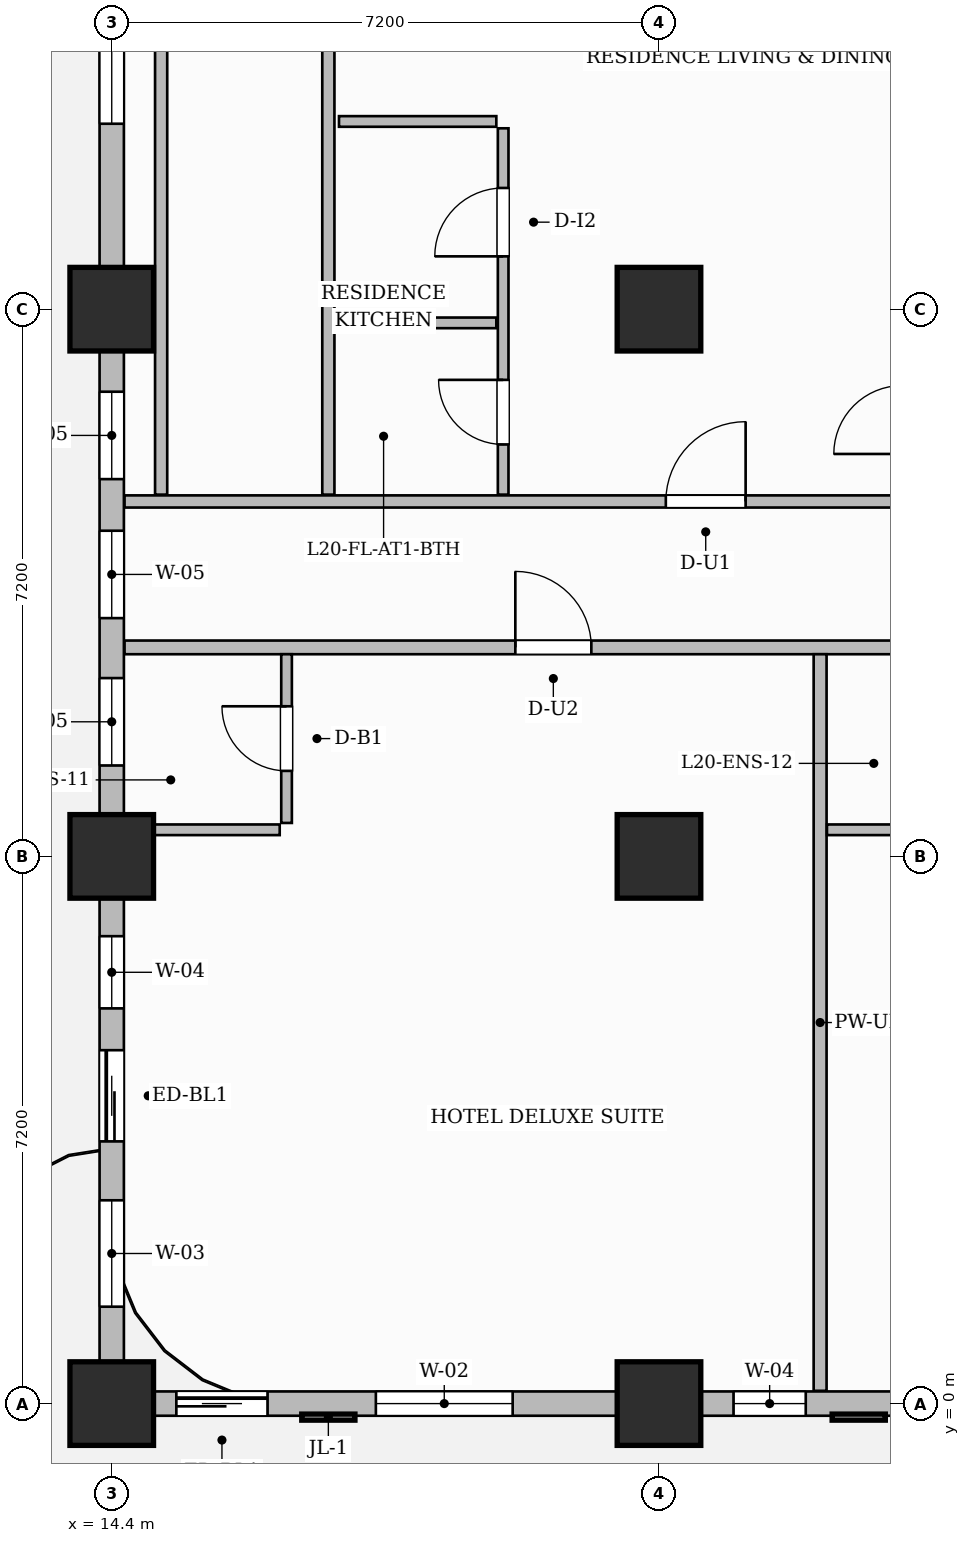
"""IFC4 building model, lengths in metres.
Left out: names, types, materials, properties, quantities, classifications, styles, units other than length and angle.
Written with IfcOpenShell. Run it as: python <this file> out.ifc"""

import sys

from ifc_helpers import new_model, si_unit, direction, frame, frame_2d, origin, origin_2d, place, context, subcontext, project, spatial, rectangle, extrude, source, transform, mapped, element, fill, save


model = new_model("IFC4")
c1 = context("Model", 3, precision=1e-05, world=origin(), true_north=direction((0.0, 1.0)))
c2 = subcontext(c1, "Body", "Model", "MODEL_VIEW")
j1 = project(units=[si_unit("LENGTHUNIT", "METRE"), si_unit("PLANEANGLEUNIT", "RADIAN")], contexts=[c1])
p1 = place(None, origin())
s1 = spatial("IfcSite", under=j1, at=p1, CompositionType="ELEMENT")
p2 = place(p1, origin())
s2 = spatial("IfcBuilding", under=s1, at=p2, CompositionType="ELEMENT")
p3 = place(p2, frame((0.0, 0.0, 84.2)))
s3 = spatial("IfcBuildingStorey", under=s2, at=p3, CompositionType="ELEMENT", Elevation=84.2)
m1 = source(origin(), c2, "Body", "SweptSolid", [
    extrude(rectangle(XDim=1.1, YDim=1.1, at=origin_2d()), origin(), (0.0, 0.0, 1.0), 3.7),
])
for number, where, z_axis, x_axis in (
    (1, (14.4, 0.0, 0.0), (0.0, 0.0, 1.0), (1.0, 0.0, 0.0)),
    (2, (14.4, 7.2, 0.0), (0.0, 0.0, 1.0), (1.0, 0.0, 0.0)),
    (3, (14.4, 14.4, 0.0), (0.0, 0.0, 1.0), (1.0, 0.0, 0.0)),
    (4, (21.6, 0.0, 0.0), (0.0, 0.0, 1.0), (1.0, 0.0, 0.0)),
    (5, (21.6, 7.2, 0.0), (0.0, 0.0, 1.0), (1.0, 0.0, 0.0)),
    (6, (21.6, 14.4, 0.0), (0.0, 0.0, 1.0), (1.0, 0.0, 0.0)),
):
    element("IfcColumn", number, at=place(p3, frame(where, z_axis=z_axis, x_axis=x_axis)), inside=s3, PredefinedType="COLUMN", context=c2, shape_type="MappedRepresentation", body=[
        mapped(m1, transform((0.0, 0.0, 0.0), scale=1.0)),
    ])
p4 = place(p3, frame((14.568, 9.95, 0.0), z_axis=(0.0, 0.0, 1.0), x_axis=(1.0, 0.0, 0.0)))
e7 = element("IfcWall", 7, at=p4, inside=s3, PredefinedType="PARTITIONING", context=c2, shape_type="SweptSolid", body=[
    extrude(rectangle(XDim=15.542, YDim=0.18, at=frame_2d((7.771, 0.0))), origin(), (0.0, 0.0, 1.0), 3.45),
])
p5 = place(p4, frame((5.142, 0.0, 0.0)))
e8 = element("IfcOpeningElement", 8, at=p5, cuts=e7, PredefinedType="OPENING", context=c2, shape_type="SweptSolid", body=[
    extrude(rectangle(XDim=1.0, YDim=2.2, at=frame_2d((0.5, 1.1))), frame((0.0, 0.1, 0.0), z_axis=(0.0, -1.0, 0.0), x_axis=(1.0, 0.0, 0.0)), (0.0, 0.0, 1.0), 0.2),
])
p6 = place(p4, frame((13.017, 0.0, 0.0)))
e9 = element("IfcOpeningElement", 9, at=p6, cuts=e7, PredefinedType="OPENING", context=c2, shape_type="SweptSolid", body=[
    extrude(rectangle(XDim=1.05, YDim=2.25, at=frame_2d((0.525, 1.125))), frame((0.0, 0.1, 0.0), z_axis=(0.0, -1.0, 0.0), x_axis=(1.0, 0.0, 0.0)), (0.0, 0.0, 1.0), 0.2),
])
p7 = place(p3, frame((14.568, 11.87, 0.0), z_axis=(0.0, 0.0, 1.0), x_axis=(1.0, 0.0, 0.0)))
e10 = element("IfcWall", 10, at=p7, inside=s3, PredefinedType="PARTITIONING", context=c2, shape_type="SweptSolid", body=[
    extrude(rectangle(XDim=15.542, YDim=0.16, at=frame_2d((7.771, 0.0))), origin(), (0.0, 0.0, 1.0), 3.45),
])
p8 = place(p7, frame((7.122, 0.0, 0.0)))
e11 = element("IfcOpeningElement", 11, at=p8, cuts=e10, PredefinedType="OPENING", context=c2, shape_type="SweptSolid", body=[
    extrude(rectangle(XDim=1.05, YDim=2.25, at=frame_2d((0.525, 1.125))), frame((0.0, 0.09, 0.0), z_axis=(0.0, -1.0, 0.0), x_axis=(1.0, 0.0, 0.0)), (0.0, 0.0, 1.0), 0.18),
])
p9 = place(p3, frame((23.72, 0.168, 0.0), z_axis=(0.0, 0.0, 1.0), x_axis=(0.0, 1.0, 0.0)))
e12 = element("IfcWall", 12, at=p9, inside=s3, PredefinedType="PARTITIONING", context=c2, shape_type="SweptSolid", body=[
    extrude(rectangle(XDim=9.692, YDim=0.17, at=frame_2d((4.846, 0.0))), origin(), (0.0, 0.0, 1.0), 3.45),
])
p10 = place(p3, frame((16.7, 7.64, 0.0), z_axis=(0.0, 0.0, 1.0), x_axis=(0.0, 1.0, 0.0)))
e13 = element("IfcWall", 13, at=p10, inside=s3, PredefinedType="PARTITIONING", context=c2, shape_type="SweptSolid", body=[
    extrude(rectangle(XDim=2.22, YDim=0.14, at=frame_2d((1.11, 0.0))), origin(), (0.0, 0.0, 1.0), 3.45),
])
p11 = place(p10, frame((0.685, 0.0, 0.0)))
e14 = element("IfcOpeningElement", 14, at=p11, cuts=e13, PredefinedType="OPENING", context=c2, shape_type="SweptSolid", body=[
    extrude(rectangle(XDim=0.85, YDim=2.1, at=frame_2d((0.425, 1.05))), frame((0.0, 0.08, 0.0), z_axis=(0.0, -1.0, 0.0), x_axis=(1.0, 0.0, 0.0)), (0.0, 0.0, 1.0), 0.16),
])
p12 = place(p3, frame((14.49, 7.55, 0.0), z_axis=(0.0, 0.0, 1.0), x_axis=(1.0, 0.0, 0.0)))
e15 = element("IfcWall", 15, at=p12, inside=s3, PredefinedType="PARTITIONING", context=c2, shape_type="SweptSolid", body=[
    extrude(rectangle(XDim=2.12, YDim=0.14, at=frame_2d((1.06, 0.0))), origin(), (0.0, 0.0, 1.0), 3.45),
])
p13 = place(p3, frame((23.81, 7.55, 0.0), z_axis=(0.0, 0.0, 1.0), x_axis=(1.0, 0.0, 0.0)))
e16 = element("IfcWall", 16, at=p13, inside=s3, PredefinedType="PARTITIONING", context=c2, shape_type="SweptSolid", body=[
    extrude(rectangle(XDim=2.12, YDim=0.14, at=frame_2d((1.06, 0.0))), origin(), (0.0, 0.0, 1.0), 3.45),
])
for number, where, z_axis, x_axis in (
    (17, (15.05, 11.96, 0.0), (0.0, 0.0, 1.0), (0.0, 1.0, 0.0)),
    (18, (17.25, 11.96, 0.0), (0.0, 0.0, 1.0), (0.0, 1.0, 0.0)),
):
    element("IfcWall", number, at=place(p3, frame(where, z_axis=z_axis, x_axis=x_axis)), inside=s3, PredefinedType="PARTITIONING", context=c2, shape_type="SweptSolid", body=[
        extrude(rectangle(XDim=13.15, YDim=0.16, at=frame_2d((6.575, 0.0))), origin(), (0.0, 0.0, 1.0), 3.45),
    ])
p14 = place(p3, frame((19.55, 11.96, 0.0), z_axis=(0.0, 0.0, 1.0), x_axis=(0.0, 1.0, 0.0)))
e19 = element("IfcWall", 19, at=p14, inside=s3, PredefinedType="PARTITIONING", context=c2, shape_type="SweptSolid", body=[
    extrude(rectangle(XDim=4.82, YDim=0.14, at=frame_2d((2.41, 0.0))), origin(), (0.0, 0.0, 1.0), 3.45),
])
p15 = place(p14, frame((0.66, 0.0, 0.0)))
e20 = element("IfcOpeningElement", 20, at=p15, cuts=e19, PredefinedType="OPENING", context=c2, shape_type="SweptSolid", body=[
    extrude(rectangle(XDim=0.85, YDim=2.1, at=frame_2d((0.425, 1.05))), frame((0.0, 0.08, 0.0), z_axis=(0.0, -1.0, 0.0), x_axis=(1.0, 0.0, 0.0)), (0.0, 0.0, 1.0), 0.16),
])
p16 = place(p14, frame((3.135, 0.0, 0.0)))
e21 = element("IfcOpeningElement", 21, at=p16, cuts=e19, PredefinedType="OPENING", context=c2, shape_type="SweptSolid", body=[
    extrude(rectangle(XDim=0.9, YDim=2.15, at=frame_2d((0.45, 1.075))), frame((0.0, 0.08, 0.0), z_axis=(0.0, -1.0, 0.0), x_axis=(1.0, 0.0, 0.0)), (0.0, 0.0, 1.0), 0.16),
])
p17 = place(p3, frame((17.39, 14.22, 0.0), z_axis=(0.0, 0.0, 1.0), x_axis=(1.0, 0.0, 0.0)))
e22 = element("IfcWall", 22, at=p17, inside=s3, PredefinedType="PARTITIONING", context=c2, shape_type="SweptSolid", body=[
    extrude(rectangle(XDim=2.07, YDim=0.14, at=frame_2d((1.035, 0.0))), origin(), (0.0, 0.0, 1.0), 2.885),
])
p18 = place(p3, frame((17.39, 16.87, 0.0), z_axis=(0.0, 0.0, 1.0), x_axis=(1.0, 0.0, 0.0)))
e23 = element("IfcWall", 23, at=p18, inside=s3, PredefinedType="PARTITIONING", context=c2, shape_type="SweptSolid", body=[
    extrude(rectangle(XDim=2.07, YDim=0.14, at=frame_2d((1.035, 0.0))), origin(), (0.0, 0.0, 1.0), 3.45),
])
p19 = place(p3, frame((14.4, 0.0, 0.0), z_axis=(0.0, 0.0, 1.0), x_axis=(1.0, 0.0, 0.0)))
e24 = element("IfcWall", 24, at=p19, inside=s3, PredefinedType="SOLIDWALL", context=c2, shape_type="SweptSolid", body=[
    extrude(rectangle(XDim=43.2, YDim=0.32, at=frame_2d((21.6, 0.0))), origin(), (0.0, 0.0, 1.0), 2.885),
])
p20 = place(p19, frame((0.85, 0.0, 0.0)))
e25 = element("IfcOpeningElement", 25, at=p20, cuts=e24, PredefinedType="OPENING", context=c2, shape_type="SweptSolid", body=[
    extrude(rectangle(XDim=1.2, YDim=2.2, at=frame_2d((0.6, 1.1))), frame((0.0, 0.17, 0.0), z_axis=(0.0, -1.0, 0.0), x_axis=(1.0, 0.0, 0.0)), (0.0, 0.0, 1.0), 0.34),
])
p21 = place(p19, frame((3.475, 0.0, 0.8)))
e26 = element("IfcOpeningElement", 26, at=p21, cuts=e24, PredefinedType="OPENING", context=c2, shape_type="SweptSolid", body=[
    extrude(rectangle(XDim=1.8, YDim=1.85, at=frame_2d((0.9, 0.925))), frame((0.0, 0.17, 0.0), z_axis=(0.0, -1.0, 0.0), x_axis=(1.0, 0.0, 0.0)), (0.0, 0.0, 1.0), 0.34),
])
p22 = place(p19, frame((8.181, 0.0, 0.8)))
e27 = element("IfcOpeningElement", 27, at=p22, cuts=e24, PredefinedType="OPENING", context=c2, shape_type="SweptSolid", body=[
    extrude(rectangle(XDim=0.95, YDim=1.75, at=frame_2d((0.475, 0.875))), frame((0.0, 0.17, 0.0), z_axis=(0.0, -1.0, 0.0), x_axis=(1.0, 0.0, 0.0)), (0.0, 0.0, 1.0), 0.34),
])
p23 = place(p19, frame((10.564, 0.0, 0.8)))
e28 = element("IfcOpeningElement", 28, at=p23, cuts=e24, PredefinedType="OPENING", context=c2, shape_type="SweptSolid", body=[
    extrude(rectangle(XDim=1.8, YDim=1.85, at=frame_2d((0.9, 0.925))), frame((0.0, 0.17, 0.0), z_axis=(0.0, -1.0, 0.0), x_axis=(1.0, 0.0, 0.0)), (0.0, 0.0, 1.0), 0.34),
])
p24 = place(p19, frame((16.804, 0.0, 0.8)))
e29 = element("IfcOpeningElement", 29, at=p24, cuts=e24, PredefinedType="OPENING", context=c2, shape_type="SweptSolid", body=[
    extrude(rectangle(XDim=1.8, YDim=1.85, at=frame_2d((0.9, 0.925))), frame((0.0, 0.17, 0.0), z_axis=(0.0, -1.0, 0.0), x_axis=(1.0, 0.0, 0.0)), (0.0, 0.0, 1.0), 0.34),
])
p25 = place(p19, frame((21.725, 0.0, 0.8)))
e30 = element("IfcOpeningElement", 30, at=p25, cuts=e24, PredefinedType="OPENING", context=c2, shape_type="SweptSolid", body=[
    extrude(rectangle(XDim=1.8, YDim=1.85, at=frame_2d((0.9, 0.925))), frame((0.0, 0.17, 0.0), z_axis=(0.0, -1.0, 0.0), x_axis=(1.0, 0.0, 0.0)), (0.0, 0.0, 1.0), 0.34),
])
p26 = place(p19, frame((24.475, 0.0, 0.8)))
e31 = element("IfcOpeningElement", 31, at=p26, cuts=e24, PredefinedType="OPENING", context=c2, shape_type="SweptSolid", body=[
    extrude(rectangle(XDim=1.8, YDim=1.85, at=frame_2d((0.9, 0.925))), frame((0.0, 0.17, 0.0), z_axis=(0.0, -1.0, 0.0), x_axis=(1.0, 0.0, 0.0)), (0.0, 0.0, 1.0), 0.34),
])
p27 = place(p19, frame((29.075, 0.0, 0.8)))
e32 = element("IfcOpeningElement", 32, at=p27, cuts=e24, PredefinedType="OPENING", context=c2, shape_type="SweptSolid", body=[
    extrude(rectangle(XDim=1.8, YDim=1.85, at=frame_2d((0.9, 0.925))), frame((0.0, 0.17, 0.0), z_axis=(0.0, -1.0, 0.0), x_axis=(1.0, 0.0, 0.0)), (0.0, 0.0, 1.0), 0.34),
])
p28 = place(p19, frame((32.125, 0.0, 0.8)))
e33 = element("IfcOpeningElement", 33, at=p28, cuts=e24, PredefinedType="OPENING", context=c2, shape_type="SweptSolid", body=[
    extrude(rectangle(XDim=1.8, YDim=1.85, at=frame_2d((0.9, 0.925))), frame((0.0, 0.17, 0.0), z_axis=(0.0, -1.0, 0.0), x_axis=(1.0, 0.0, 0.0)), (0.0, 0.0, 1.0), 0.34),
])
p29 = place(p19, frame((36.875, 0.0, 0.8)))
e34 = element("IfcOpeningElement", 34, at=p29, cuts=e24, PredefinedType="OPENING", context=c2, shape_type="SweptSolid", body=[
    extrude(rectangle(XDim=1.8, YDim=1.85, at=frame_2d((0.9, 0.925))), frame((0.0, 0.17, 0.0), z_axis=(0.0, -1.0, 0.0), x_axis=(1.0, 0.0, 0.0)), (0.0, 0.0, 1.0), 0.34),
])
p30 = place(p19, frame((39.925, 0.0, 0.8)))
e35 = element("IfcOpeningElement", 35, at=p30, cuts=e24, PredefinedType="OPENING", context=c2, shape_type="SweptSolid", body=[
    extrude(rectangle(XDim=1.8, YDim=1.85, at=frame_2d((0.9, 0.925))), frame((0.0, 0.17, 0.0), z_axis=(0.0, -1.0, 0.0), x_axis=(1.0, 0.0, 0.0)), (0.0, 0.0, 1.0), 0.34),
])
p31 = place(p3, frame((14.4, 0.05, 0.0), z_axis=(0.0, 0.0, 1.0), x_axis=(0.0, 1.0, 0.0)))
e36 = element("IfcWall", 36, at=p31, inside=s3, PredefinedType="SOLIDWALL", context=c2, shape_type="SweptSolid", body=[
    extrude(rectangle(XDim=20.6, YDim=0.32, at=frame_2d((10.3, 0.0))), origin(), (0.0, 0.0, 1.0), 2.885),
])
p32 = place(p31, frame((3.4, 0.0, 0.0)))
e37 = element("IfcOpeningElement", 37, at=p32, cuts=e36, PredefinedType="OPENING", context=c2, shape_type="SweptSolid", body=[
    extrude(rectangle(XDim=1.2, YDim=2.2, at=frame_2d((0.6, 1.1))), frame((0.0, 0.17, 0.0), z_axis=(0.0, -1.0, 0.0), x_axis=(1.0, 0.0, 0.0)), (0.0, 0.0, 1.0), 0.34),
])
p33 = place(p31, frame((1.225, 0.0, 0.8)))
e38 = element("IfcOpeningElement", 38, at=p33, cuts=e36, PredefinedType="OPENING", context=c2, shape_type="SweptSolid", body=[
    extrude(rectangle(XDim=1.4, YDim=1.85, at=frame_2d((0.7, 0.925))), frame((0.0, 0.17, 0.0), z_axis=(0.0, -1.0, 0.0), x_axis=(1.0, 0.0, 0.0)), (0.0, 0.0, 1.0), 0.34),
])
p34 = place(p31, frame((5.15, 0.0, 0.8)))
e39 = element("IfcOpeningElement", 39, at=p34, cuts=e36, PredefinedType="OPENING", context=c2, shape_type="SweptSolid", body=[
    extrude(rectangle(XDim=0.95, YDim=1.75, at=frame_2d((0.475, 0.875))), frame((0.0, 0.17, 0.0), z_axis=(0.0, -1.0, 0.0), x_axis=(1.0, 0.0, 0.0)), (0.0, 0.0, 1.0), 0.34),
])
p35 = place(p31, frame((8.346, 0.0, 0.8)))
e40 = element("IfcOpeningElement", 40, at=p35, cuts=e36, PredefinedType="OPENING", context=c2, shape_type="SweptSolid", body=[
    extrude(rectangle(XDim=1.15, YDim=1.8, at=frame_2d((0.575, 0.9))), frame((0.0, 0.17, 0.0), z_axis=(0.0, -1.0, 0.0), x_axis=(1.0, 0.0, 0.0)), (0.0, 0.0, 1.0), 0.34),
])
p36 = place(p31, frame((10.285, 0.0, 0.8)))
e41 = element("IfcOpeningElement", 41, at=p36, cuts=e36, PredefinedType="OPENING", context=c2, shape_type="SweptSolid", body=[
    extrude(rectangle(XDim=1.15, YDim=1.8, at=frame_2d((0.575, 0.9))), frame((0.0, 0.17, 0.0), z_axis=(0.0, -1.0, 0.0), x_axis=(1.0, 0.0, 0.0)), (0.0, 0.0, 1.0), 0.34),
])
p37 = place(p31, frame((12.114, 0.0, 0.8)))
e42 = element("IfcOpeningElement", 42, at=p37, cuts=e36, PredefinedType="OPENING", context=c2, shape_type="SweptSolid", body=[
    extrude(rectangle(XDim=1.15, YDim=1.8, at=frame_2d((0.575, 0.9))), frame((0.0, 0.17, 0.0), z_axis=(0.0, -1.0, 0.0), x_axis=(1.0, 0.0, 0.0)), (0.0, 0.0, 1.0), 0.34),
])
p38 = place(p31, frame((16.79, 0.0, 0.8)))
e43 = element("IfcOpeningElement", 43, at=p38, cuts=e36, PredefinedType="OPENING", context=c2, shape_type="SweptSolid", body=[
    extrude(rectangle(XDim=1.8, YDim=1.85, at=frame_2d((0.9, 0.925))), frame((0.0, 0.17, 0.0), z_axis=(0.0, -1.0, 0.0), x_axis=(1.0, 0.0, 0.0)), (0.0, 0.0, 1.0), 0.34),
])
m2 = source(origin(), c2, "Body", "SweptSolid", [
    extrude(rectangle(XDim=0.85, YDim=2.1, at=frame_2d((0.425, 1.05))), frame((0.0, 0.025, 0.0), z_axis=(0.0, -1.0, 0.0), x_axis=(1.0, 0.0, 0.0)), (0.0, 0.0, 1.0), 0.05),
])
p39 = place(p11, origin())
e44 = element("IfcDoor", 44, at=p39, inside=s3, OperationType="SINGLE_SWING_RIGHT", PredefinedType="DOOR", context=c2, shape_type="MappedRepresentation", body=[
    mapped(m2, transform((0.0, 0.0, 0.0), scale=1.0)),
])
fill(e14, e44)
m3 = source(origin(), c2, "Body", "SweptSolid", [
    extrude(rectangle(XDim=1.0, YDim=2.2, at=frame_2d((0.5, 1.1))), frame((0.0, 0.025, 0.0), z_axis=(0.0, -1.0, 0.0), x_axis=(1.0, 0.0, 0.0)), (0.0, 0.0, 1.0), 0.05),
])
p40 = place(p5, origin())
e45 = element("IfcDoor", 45, at=p40, inside=s3, OperationType="SINGLE_SWING_LEFT", PredefinedType="DOOR", context=c2, shape_type="MappedRepresentation", body=[
    mapped(m3, transform((0.0, 0.0, 0.0), scale=1.0)),
])
fill(e8, e45)
p41 = place(p15, origin())
e46 = element("IfcDoor", 46, at=p41, inside=s3, OperationType="SINGLE_SWING_RIGHT", PredefinedType="DOOR", context=c2, shape_type="MappedRepresentation", body=[
    mapped(m2, transform((0.0, 0.0, 0.0), scale=1.0)),
])
fill(e20, e46)
m4 = source(origin(), c2, "Body", "SweptSolid", [
    extrude(rectangle(XDim=0.9, YDim=2.15, at=frame_2d((0.45, 1.075))), frame((0.0, 0.025, 0.0), z_axis=(0.0, -1.0, 0.0), x_axis=(1.0, 0.0, 0.0)), (0.0, 0.0, 1.0), 0.05),
])
p42 = place(p16, origin())
e47 = element("IfcDoor", 47, at=p42, inside=s3, OperationType="SINGLE_SWING_LEFT", PredefinedType="DOOR", context=c2, shape_type="MappedRepresentation", body=[
    mapped(m4, transform((0.0, 0.0, 0.0), scale=1.0)),
])
fill(e21, e47)
m5 = source(origin(), c2, "Body", "SweptSolid", [
    extrude(rectangle(XDim=1.05, YDim=2.25, at=frame_2d((0.525, 1.125))), frame((0.0, 0.025, 0.0), z_axis=(0.0, -1.0, 0.0), x_axis=(1.0, 0.0, 0.0)), (0.0, 0.0, 1.0), 0.05),
])
p43 = place(p8, origin())
e48 = element("IfcDoor", 48, at=p43, inside=s3, OperationType="SINGLE_SWING_RIGHT", PredefinedType="DOOR", context=c2, shape_type="MappedRepresentation", body=[
    mapped(m5, transform((0.0, 0.0, 0.0), scale=1.0)),
])
fill(e11, e48)
m6 = source(origin(), c2, "Body", "SweptSolid", [
    extrude(rectangle(XDim=1.2, YDim=2.2, at=frame_2d((0.6, 1.1))), frame((0.0, 0.025, 0.0), z_axis=(0.0, -1.0, 0.0), x_axis=(1.0, 0.0, 0.0)), (0.0, 0.0, 1.0), 0.05),
])
p44 = place(p20, origin())
e49 = element("IfcDoor", 49, at=p44, inside=s3, OperationType="SLIDING_TO_LEFT", PredefinedType="DOOR", context=c2, shape_type="MappedRepresentation", body=[
    mapped(m6, transform((0.0, 0.0, 0.0), scale=1.0)),
])
fill(e25, e49)
p45 = place(p32, origin())
e50 = element("IfcDoor", 50, at=p45, inside=s3, OperationType="SLIDING_TO_LEFT", PredefinedType="DOOR", context=c2, shape_type="MappedRepresentation", body=[
    mapped(m6, transform((0.0, 0.0, 0.0), scale=1.0)),
])
fill(e37, e50)
m7 = source(origin(), c2, "Body", "SweptSolid", [
    extrude(rectangle(XDim=1.8, YDim=1.85, at=frame_2d((0.9, 0.925))), frame((0.0, 0.03, 0.0), z_axis=(0.0, -1.0, 0.0), x_axis=(1.0, 0.0, 0.0)), (0.0, 0.0, 1.0), 0.06),
])
p46 = place(p21, origin())
e51 = element("IfcWindow", 51, at=p46, inside=s3, PartitioningType="DOUBLE_PANEL_VERTICAL", PredefinedType="WINDOW", context=c2, shape_type="MappedRepresentation", body=[
    mapped(m7, transform((0.0, 0.0, 0.0), scale=1.0)),
])
fill(e26, e51)
m8 = source(origin(), c2, "Body", "SweptSolid", [
    extrude(rectangle(XDim=0.95, YDim=1.75, at=frame_2d((0.475, 0.875))), frame((0.0, 0.03, 0.0), z_axis=(0.0, -1.0, 0.0), x_axis=(1.0, 0.0, 0.0)), (0.0, 0.0, 1.0), 0.06),
])
p47 = place(p22, origin())
e52 = element("IfcWindow", 52, at=p47, inside=s3, PartitioningType="SINGLE_PANEL", PredefinedType="WINDOW", context=c2, shape_type="MappedRepresentation", body=[
    mapped(m8, transform((0.0, 0.0, 0.0), scale=1.0)),
])
fill(e27, e52)
m9 = source(origin(), c2, "Body", "SweptSolid", [
    extrude(rectangle(XDim=1.4, YDim=1.85, at=frame_2d((0.7, 0.925))), frame((0.0, 0.03, 0.0), z_axis=(0.0, -1.0, 0.0), x_axis=(1.0, 0.0, 0.0)), (0.0, 0.0, 1.0), 0.06),
])
p48 = place(p33, origin())
e53 = element("IfcWindow", 53, at=p48, inside=s3, PartitioningType="SINGLE_PANEL", PredefinedType="WINDOW", context=c2, shape_type="MappedRepresentation", body=[
    mapped(m9, transform((0.0, 0.0, 0.0), scale=1.0)),
])
fill(e38, e53)
p49 = place(p34, origin())
e54 = element("IfcWindow", 54, at=p49, inside=s3, PartitioningType="SINGLE_PANEL", PredefinedType="WINDOW", context=c2, shape_type="MappedRepresentation", body=[
    mapped(m8, transform((0.0, 0.0, 0.0), scale=1.0)),
])
fill(e39, e54)
m10 = source(origin(), c2, "Body", "SweptSolid", [
    extrude(rectangle(XDim=1.15, YDim=1.8, at=frame_2d((0.575, 0.9))), frame((0.0, 0.03, 0.0), z_axis=(0.0, -1.0, 0.0), x_axis=(1.0, 0.0, 0.0)), (0.0, 0.0, 1.0), 0.06),
])
p50 = place(p35, origin())
e55 = element("IfcWindow", 55, at=p50, inside=s3, PartitioningType="SINGLE_PANEL", PredefinedType="WINDOW", context=c2, shape_type="MappedRepresentation", body=[
    mapped(m10, transform((0.0, 0.0, 0.0), scale=1.0)),
])
fill(e40, e55)
p51 = place(p36, origin())
e56 = element("IfcWindow", 56, at=p51, inside=s3, PartitioningType="SINGLE_PANEL", PredefinedType="WINDOW", context=c2, shape_type="MappedRepresentation", body=[
    mapped(m10, transform((0.0, 0.0, 0.0), scale=1.0)),
])
fill(e41, e56)
p52 = place(p37, origin())
e57 = element("IfcWindow", 57, at=p52, inside=s3, PartitioningType="SINGLE_PANEL", PredefinedType="WINDOW", context=c2, shape_type="MappedRepresentation", body=[
    mapped(m10, transform((0.0, 0.0, 0.0), scale=1.0)),
])
fill(e42, e57)
p53 = place(p38, origin())
e58 = element("IfcWindow", 58, at=p53, inside=s3, PartitioningType="DOUBLE_PANEL_VERTICAL", PredefinedType="WINDOW", context=c2, shape_type="MappedRepresentation", body=[
    mapped(m7, transform((0.0, 0.0, 0.0), scale=1.0)),
])
fill(e43, e58)
save(model, sys.argv[1])
